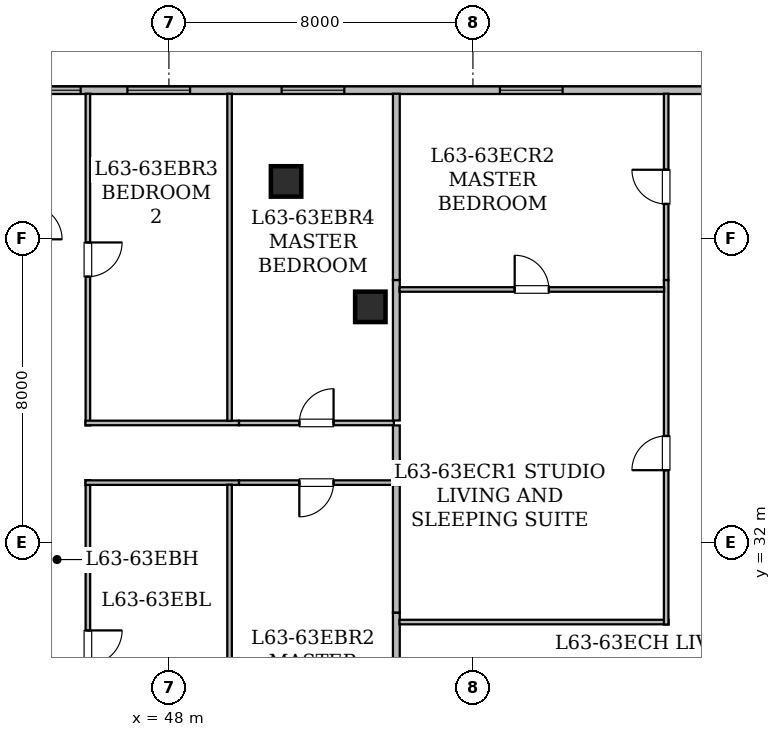
"""IFC4 building model, lengths in metres.
Left out: names, types, materials, properties, quantities, classifications, styles, units other than length and angle.
Written with IfcOpenShell. Run it as: python <this file> out.ifc"""

import sys

from ifc_helpers import new_model, si_unit, direction, frame, frame_2d, origin, origin_2d, place, context, subcontext, project, spatial, rectangle, hollow_rectangle, extrude, element, fill, save


model = new_model("IFC4")
c1 = context("Model", 3, precision=1e-05, world=origin(), true_north=direction((0.0, 1.0)))
c2 = subcontext(c1, "Body", "Model", "MODEL_VIEW")
j1 = project(units=[si_unit("LENGTHUNIT", "METRE"), si_unit("PLANEANGLEUNIT", "RADIAN")], contexts=[c1])
p1 = place(None, origin())
s1 = spatial("IfcSite", under=j1, at=p1, CompositionType="ELEMENT")
p2 = place(p1, origin())
s2 = spatial("IfcBuilding", under=s1, at=p2, CompositionType="ELEMENT")
p3 = place(p2, frame((0.0, 0.0, 246.4)))
s3 = spatial("IfcBuildingStorey", under=s2, at=p3, CompositionType="ELEMENT", Elevation=246.4)
for number, where, z_axis, x_axis in (
    (1, (51.083, 41.5, 0.0), (0.0, 0.0, 1.0), (1.0, 0.0, 0.0)),
    (2, (53.3, 38.2, 0.0), (0.0, 0.0, 1.0), (1.0, 0.0, 0.0)),
):
    element("IfcColumn", number, at=place(p3, frame(where, z_axis=z_axis, x_axis=x_axis)), inside=s3, PredefinedType="COLUMN", context=c2, shape_type="SweptSolid", body=[
        extrude(hollow_rectangle(XDim=0.8, YDim=0.8, WallThickness=0.04, at=origin_2d()), origin(), (0.0, 0.0, 1.0), 3.65),
    ])
p4 = place(p3, frame((24.302, 43.9, 0.0), z_axis=(0.0, 0.0, 1.0), x_axis=(1.0, 0.0, 0.0)))
e3 = element("IfcWall", 3, at=p4, inside=s3, PredefinedType="STANDARD", context=c2, shape_type="SweptSolid", body=[
    extrude(rectangle(XDim=41.457, YDim=0.2, at=frame_2d((20.729, 0.0))), origin(), (0.0, 0.0, 1.0), 3.43),
])
p5 = place(p4, frame((4.673, 0.0, 0.85)))
e4 = element("IfcOpeningElement", 4, at=p5, cuts=e3, PredefinedType="OPENING", context=c2, shape_type="SweptSolid", body=[
    extrude(rectangle(XDim=1.65, YDim=1.55, at=frame_2d((0.825, 0.775))), frame((0.0, 0.11, 0.0), z_axis=(0.0, -1.0, 0.0), x_axis=(1.0, 0.0, 0.0)), (0.0, 0.0, 1.0), 0.22),
])
p6 = place(p4, frame((12.063, 0.0, 0.85)))
e5 = element("IfcOpeningElement", 5, at=p6, cuts=e3, PredefinedType="OPENING", context=c2, shape_type="SweptSolid", body=[
    extrude(rectangle(XDim=1.65, YDim=1.55, at=frame_2d((0.825, 0.775))), frame((0.0, 0.11, 0.0), z_axis=(0.0, -1.0, 0.0), x_axis=(1.0, 0.0, 0.0)), (0.0, 0.0, 1.0), 0.22),
])
p7 = place(p4, frame((14.905, 0.0, 0.85)))
e6 = element("IfcOpeningElement", 6, at=p7, cuts=e3, PredefinedType="OPENING", context=c2, shape_type="SweptSolid", body=[
    extrude(rectangle(XDim=1.65, YDim=1.55, at=frame_2d((0.825, 0.775))), frame((0.0, 0.11, 0.0), z_axis=(0.0, -1.0, 0.0), x_axis=(1.0, 0.0, 0.0)), (0.0, 0.0, 1.0), 0.22),
])
p8 = place(p4, frame((17.825, 0.0, 0.85)))
e7 = element("IfcOpeningElement", 7, at=p8, cuts=e3, PredefinedType="OPENING", context=c2, shape_type="SweptSolid", body=[
    extrude(rectangle(XDim=1.65, YDim=1.55, at=frame_2d((0.825, 0.775))), frame((0.0, 0.11, 0.0), z_axis=(0.0, -1.0, 0.0), x_axis=(1.0, 0.0, 0.0)), (0.0, 0.0, 1.0), 0.22),
])
p9 = place(p4, frame((20.176, 0.0, 0.8)))
e8 = element("IfcOpeningElement", 8, at=p9, cuts=e3, PredefinedType="OPENING", context=c2, shape_type="SweptSolid", body=[
    extrude(rectangle(XDim=1.2, YDim=1.5, at=frame_2d((0.6, 0.75))), frame((0.0, 0.11, 0.0), z_axis=(0.0, -1.0, 0.0), x_axis=(1.0, 0.0, 0.0)), (0.0, 0.0, 1.0), 0.22),
])
p10 = place(p4, frame((22.605, 0.0, 0.85)))
e9 = element("IfcOpeningElement", 9, at=p10, cuts=e3, PredefinedType="OPENING", context=c2, shape_type="SweptSolid", body=[
    extrude(rectangle(XDim=1.65, YDim=1.55, at=frame_2d((0.825, 0.775))), frame((0.0, 0.11, 0.0), z_axis=(0.0, -1.0, 0.0), x_axis=(1.0, 0.0, 0.0)), (0.0, 0.0, 1.0), 0.22),
])
p11 = place(p4, frame((26.664, 0.0, 0.85)))
e10 = element("IfcOpeningElement", 10, at=p11, cuts=e3, PredefinedType="OPENING", context=c2, shape_type="SweptSolid", body=[
    extrude(rectangle(XDim=1.65, YDim=1.55, at=frame_2d((0.825, 0.775))), frame((0.0, 0.11, 0.0), z_axis=(0.0, -1.0, 0.0), x_axis=(1.0, 0.0, 0.0)), (0.0, 0.0, 1.0), 0.22),
])
p12 = place(p4, frame((32.408, 0.0, 0.85)))
e11 = element("IfcOpeningElement", 11, at=p12, cuts=e3, PredefinedType="OPENING", context=c2, shape_type="SweptSolid", body=[
    extrude(rectangle(XDim=1.65, YDim=1.55, at=frame_2d((0.825, 0.775))), frame((0.0, 0.11, 0.0), z_axis=(0.0, -1.0, 0.0), x_axis=(1.0, 0.0, 0.0)), (0.0, 0.0, 1.0), 0.22),
])
p13 = place(p4, frame((38.688, 0.0, 0.85)))
e12 = element("IfcOpeningElement", 12, at=p13, cuts=e3, PredefinedType="OPENING", context=c2, shape_type="SweptSolid", body=[
    extrude(rectangle(XDim=1.65, YDim=1.55, at=frame_2d((0.825, 0.775))), frame((0.0, 0.11, 0.0), z_axis=(0.0, -1.0, 0.0), x_axis=(1.0, 0.0, 0.0)), (0.0, 0.0, 1.0), 0.22),
])
p14 = place(p3, frame((45.868, 33.64, 0.0), z_axis=(0.0, 0.0, 1.0), x_axis=(0.0, -1.0, 0.0)))
e13 = element("IfcWall", 13, at=p14, inside=s3, PredefinedType="PARTITIONING", context=c2, shape_type="SweptSolid", body=[
    extrude(rectangle(XDim=8.808, YDim=0.12, at=frame_2d((4.404, 0.0))), origin(), (0.0, 0.0, 1.0), 2.957),
])
p15 = place(p14, frame((3.954, 0.0, 0.0)))
e14 = element("IfcOpeningElement", 14, at=p15, cuts=e13, PredefinedType="OPENING", context=c2, shape_type="SweptSolid", body=[
    extrude(rectangle(XDim=0.9, YDim=2.1, at=frame_2d((0.45, 1.05))), frame((0.0, 0.07, 0.0), z_axis=(0.0, -1.0, 0.0), x_axis=(1.0, 0.0, 0.0)), (0.0, 0.0, 1.0), 0.14),
])
p16 = place(p3, frame((49.845, 33.575, 0.0), z_axis=(0.0, 0.0, 1.0), x_axis=(-1.0, 0.0, 0.0)))
e15 = element("IfcWall", 15, at=p16, inside=s3, PredefinedType="PARTITIONING", context=c2, shape_type="SweptSolid", body=[
    extrude(rectangle(XDim=4.042, YDim=0.12, at=frame_2d((2.021, 0.0))), origin(), (0.0, 0.0, 1.0), 2.957),
])
p17 = place(p3, frame((53.92, 33.575, 0.0), z_axis=(0.0, 0.0, 1.0), x_axis=(-1.0, 0.0, 0.0)))
e16 = element("IfcWall", 16, at=p17, inside=s3, PredefinedType="PARTITIONING", context=c2, shape_type="SweptSolid", body=[
    extrude(rectangle(XDim=4.075, YDim=0.12, at=frame_2d((2.038, 0.0))), origin(), (0.0, 0.0, 1.0), 2.725),
])
p18 = place(p17, frame((1.588, 0.0, 0.0)))
e17 = element("IfcOpeningElement", 17, at=p18, cuts=e16, PredefinedType="OPENING", context=c2, shape_type="SweptSolid", body=[
    extrude(rectangle(XDim=0.9, YDim=2.1, at=frame_2d((0.45, 1.05))), frame((0.0, 0.07, 0.0), z_axis=(0.0, -1.0, 0.0), x_axis=(1.0, 0.0, 0.0)), (0.0, 0.0, 1.0), 0.14),
])
p19 = place(p3, frame((45.868, 43.808, 0.0), z_axis=(0.0, 0.0, 1.0), x_axis=(0.0, -1.0, 0.0)))
e18 = element("IfcWall", 18, at=p19, inside=s3, PredefinedType="PARTITIONING", context=c2, shape_type="SweptSolid", body=[
    extrude(rectangle(XDim=8.728, YDim=0.12, at=frame_2d((4.364, 0.0))), origin(), (0.0, 0.0, 1.0), 2.725),
])
p20 = place(p19, frame((3.914, 0.0, 0.0)))
e19 = element("IfcOpeningElement", 19, at=p20, cuts=e18, PredefinedType="OPENING", context=c2, shape_type="SweptSolid", body=[
    extrude(rectangle(XDim=0.9, YDim=2.1, at=frame_2d((0.45, 1.05))), frame((0.0, 0.07, 0.0), z_axis=(0.0, -1.0, 0.0), x_axis=(1.0, 0.0, 0.0)), (0.0, 0.0, 1.0), 0.14),
])
p21 = place(p3, frame((45.803, 35.145, 0.0), z_axis=(0.0, 0.0, 1.0), x_axis=(1.0, 0.0, 0.0)))
e20 = element("IfcWall", 20, at=p21, inside=s3, PredefinedType="PARTITIONING", context=c2, shape_type="SweptSolid", body=[
    extrude(rectangle(XDim=4.042, YDim=0.12, at=frame_2d((2.021, 0.0))), origin(), (0.0, 0.0, 1.0), 3.43),
])
p22 = place(p3, frame((49.845, 35.145, 0.0), z_axis=(0.0, 0.0, 1.0), x_axis=(1.0, 0.0, 0.0)))
e21 = element("IfcWall", 21, at=p22, inside=s3, PredefinedType="PARTITIONING", context=c2, shape_type="SweptSolid", body=[
    extrude(rectangle(XDim=4.075, YDim=0.12, at=frame_2d((2.038, 0.0))), origin(), (0.0, 0.0, 1.0), 2.725),
])
p23 = place(p22, frame((1.588, 0.0, 0.0)))
e22 = element("IfcOpeningElement", 22, at=p23, cuts=e21, PredefinedType="OPENING", context=c2, shape_type="SweptSolid", body=[
    extrude(rectangle(XDim=0.9, YDim=2.1, at=frame_2d((0.45, 1.05))), frame((0.0, 0.07, 0.0), z_axis=(0.0, -1.0, 0.0), x_axis=(1.0, 0.0, 0.0)), (0.0, 0.0, 1.0), 0.14),
])
p24 = place(p3, frame((53.985, 35.08, 0.0), z_axis=(0.0, 0.0, 1.0), x_axis=(0.0, -1.0, 0.0)))
e23 = element("IfcWall", 23, at=p24, inside=s3, PredefinedType="STANDARD", context=c2, shape_type="SweptSolid", body=[
    extrude(rectangle(XDim=1.44, YDim=0.18, at=frame_2d((0.72, 0.0))), origin(), (0.0, 0.0, 1.0), 2.687),
])
p25 = place(p3, frame((49.596, 33.521, 0.0), z_axis=(0.0, 0.0, 1.0), x_axis=(0.0, -1.0, 0.0)))
e24 = element("IfcWall", 24, at=p25, inside=s3, PredefinedType="PARTITIONING", context=c2, shape_type="SweptSolid", body=[
    extrude(rectangle(XDim=8.689, YDim=0.12, at=frame_2d((4.344, 0.0))), origin(), (0.0, 0.0, 1.0), 2.957),
])
p26 = place(p3, frame((53.985, 30.155, 0.0), z_axis=(0.0, 0.0, 1.0), x_axis=(0.0, -1.0, 0.0)))
e25 = element("IfcWall", 25, at=p26, inside=s3, PredefinedType="STANDARD", context=c2, shape_type="SweptSolid", body=[
    extrude(rectangle(XDim=2.078, YDim=0.18, at=frame_2d((1.039, 0.0))), origin(), (0.0, 0.0, 1.0), 3.43),
])
p27 = place(p3, frame((53.985, 33.51, 0.0), z_axis=(0.0, 0.0, 1.0), x_axis=(0.0, -1.0, 0.0)))
e26 = element("IfcWall", 26, at=p27, inside=s3, PredefinedType="STANDARD", context=c2, shape_type="SweptSolid", body=[
    extrude(rectangle(XDim=3.355, YDim=0.18, at=frame_2d((1.677, 0.0))), origin(), (0.0, 0.0, 1.0), 2.687),
])
p28 = place(p3, frame((49.596, 43.808, 0.0), z_axis=(0.0, 0.0, 1.0), x_axis=(0.0, -1.0, 0.0)))
e27 = element("IfcWall", 27, at=p28, inside=s3, PredefinedType="PARTITIONING", context=c2, shape_type="SweptSolid", body=[
    extrude(rectangle(XDim=8.609, YDim=0.12, at=frame_2d((4.305, 0.0))), origin(), (0.0, 0.0, 1.0), 2.725),
])
p29 = place(p3, frame((53.985, 38.906, 0.0), z_axis=(0.0, 0.0, 1.0), x_axis=(0.0, -1.0, 0.0)))
e28 = element("IfcWall", 28, at=p29, inside=s3, PredefinedType="STANDARD", context=c2, shape_type="SweptSolid", body=[
    extrude(rectangle(XDim=3.696, YDim=0.18, at=frame_2d((1.848, 0.0))), origin(), (0.0, 0.0, 1.0), 2.725),
])
p30 = place(p3, frame((53.985, 43.808, 0.0), z_axis=(0.0, 0.0, 1.0), x_axis=(0.0, -1.0, 0.0)))
e29 = element("IfcWall", 29, at=p30, inside=s3, PredefinedType="STANDARD", context=c2, shape_type="SweptSolid", body=[
    extrude(rectangle(XDim=4.902, YDim=0.18, at=frame_2d((2.451, 0.0))), origin(), (0.0, 0.0, 1.0), 2.887),
])
p31 = place(p3, frame((54.067, 29.906, 0.0), z_axis=(0.0, 0.0, 1.0), x_axis=(1.0, 0.0, 0.0)))
e30 = element("IfcWall", 30, at=p31, inside=s3, PredefinedType="PARTITIONING", context=c2, shape_type="SweptSolid", body=[
    extrude(rectangle(XDim=7.083, YDim=0.12, at=frame_2d((3.542, 0.0))), origin(), (0.0, 0.0, 1.0), 3.43),
])
p32 = place(p3, frame((61.085, 29.841, 0.0), z_axis=(0.0, 0.0, 1.0), x_axis=(0.0, 1.0, 0.0)))
e31 = element("IfcWall", 31, at=p32, inside=s3, PredefinedType="PARTITIONING", context=c2, shape_type="SweptSolid", body=[
    extrude(rectangle(XDim=9.065, YDim=0.12, at=frame_2d((4.532, 0.0))), origin(), (0.0, 0.0, 1.0), 2.687),
])
p33 = place(p32, frame((4.061, 0.0, 0.0)))
e32 = element("IfcOpeningElement", 32, at=p33, cuts=e31, PredefinedType="OPENING", context=c2, shape_type="SweptSolid", body=[
    extrude(rectangle(XDim=0.9, YDim=2.1, at=frame_2d((0.45, 1.05))), frame((0.0, 0.07, 0.0), z_axis=(0.0, -1.0, 0.0), x_axis=(1.0, 0.0, 0.0)), (0.0, 0.0, 1.0), 0.14),
])
p34 = place(p3, frame((61.085, 38.906, 0.0), z_axis=(0.0, 0.0, 1.0), x_axis=(0.0, 1.0, 0.0)))
e33 = element("IfcWall", 33, at=p34, inside=s3, PredefinedType="PARTITIONING", context=c2, shape_type="SweptSolid", body=[
    extrude(rectangle(XDim=4.902, YDim=0.12, at=frame_2d((2.451, 0.0))), origin(), (0.0, 0.0, 1.0), 2.725),
])
p35 = place(p34, frame((2.001, 0.0, 0.0)))
e34 = element("IfcOpeningElement", 34, at=p35, cuts=e33, PredefinedType="OPENING", context=c2, shape_type="SweptSolid", body=[
    extrude(rectangle(XDim=0.9, YDim=2.1, at=frame_2d((0.45, 1.05))), frame((0.0, 0.07, 0.0), z_axis=(0.0, -1.0, 0.0), x_axis=(1.0, 0.0, 0.0)), (0.0, 0.0, 1.0), 0.14),
])
p36 = place(p3, frame((54.067, 38.657, 0.0), z_axis=(0.0, 0.0, 1.0), x_axis=(1.0, 0.0, 0.0)))
e35 = element("IfcWall", 35, at=p36, inside=s3, PredefinedType="PARTITIONING", context=c2, shape_type="SweptSolid", body=[
    extrude(rectangle(XDim=6.964, YDim=0.12, at=frame_2d((3.482, 0.0))), origin(), (0.0, 0.0, 1.0), 2.725),
])
p37 = place(p36, frame((3.032, 0.0, 0.0)))
e36 = element("IfcOpeningElement", 36, at=p37, cuts=e35, PredefinedType="OPENING", context=c2, shape_type="SweptSolid", body=[
    extrude(rectangle(XDim=0.9, YDim=2.1, at=frame_2d((0.45, 1.05))), frame((0.0, 0.07, 0.0), z_axis=(0.0, -1.0, 0.0), x_axis=(1.0, 0.0, 0.0)), (0.0, 0.0, 1.0), 0.14),
])
p38 = place(p9, origin())
e37 = element("IfcWindow", 37, at=p38, inside=s3, PartitioningType="SINGLE_PANEL", PredefinedType="WINDOW", context=c2, shape_type="SweptSolid", body=[
    extrude(rectangle(XDim=1.2, YDim=1.5, at=frame_2d((0.6, 0.75))), frame((0.0, 0.03, 0.0), z_axis=(0.0, -1.0, 0.0), x_axis=(1.0, 0.0, 0.0)), (0.0, 0.0, 1.0), 0.06),
])
fill(e8, e37)
p39 = place(p10, origin())
e38 = element("IfcWindow", 38, at=p39, inside=s3, PartitioningType="SINGLE_PANEL", PredefinedType="WINDOW", context=c2, shape_type="SweptSolid", body=[
    extrude(rectangle(XDim=1.65, YDim=1.55, at=frame_2d((0.825, 0.775))), frame((0.0, 0.03, 0.0), z_axis=(0.0, -1.0, 0.0), x_axis=(1.0, 0.0, 0.0)), (0.0, 0.0, 1.0), 0.06),
])
fill(e9, e38)
p40 = place(p11, origin())
e39 = element("IfcWindow", 39, at=p40, inside=s3, PartitioningType="SINGLE_PANEL", PredefinedType="WINDOW", context=c2, shape_type="SweptSolid", body=[
    extrude(rectangle(XDim=1.65, YDim=1.55, at=frame_2d((0.825, 0.775))), frame((0.0, 0.03, 0.0), z_axis=(0.0, -1.0, 0.0), x_axis=(1.0, 0.0, 0.0)), (0.0, 0.0, 1.0), 0.06),
])
fill(e10, e39)
p41 = place(p12, origin())
e40 = element("IfcWindow", 40, at=p41, inside=s3, PartitioningType="SINGLE_PANEL", PredefinedType="WINDOW", context=c2, shape_type="SweptSolid", body=[
    extrude(rectangle(XDim=1.65, YDim=1.55, at=frame_2d((0.825, 0.775))), frame((0.0, 0.03, 0.0), z_axis=(0.0, -1.0, 0.0), x_axis=(1.0, 0.0, 0.0)), (0.0, 0.0, 1.0), 0.06),
])
fill(e11, e40)
p42 = place(p15, origin())
e41 = element("IfcDoor", 41, at=p42, inside=s3, OperationType="SINGLE_SWING_LEFT", PredefinedType="DOOR", context=c2, shape_type="SweptSolid", body=[
    extrude(rectangle(XDim=0.9, YDim=2.1, at=frame_2d((0.45, 1.05))), frame((0.0, 0.025, 0.0), z_axis=(0.0, -1.0, 0.0), x_axis=(1.0, 0.0, 0.0)), (0.0, 0.0, 1.0), 0.05),
])
fill(e14, e41)
p43 = place(p18, origin())
e42 = element("IfcDoor", 42, at=p43, inside=s3, OperationType="SINGLE_SWING_RIGHT", PredefinedType="DOOR", context=c2, shape_type="SweptSolid", body=[
    extrude(rectangle(XDim=0.9, YDim=2.1, at=frame_2d((0.45, 1.05))), frame((0.0, 0.025, 0.0), z_axis=(0.0, -1.0, 0.0), x_axis=(1.0, 0.0, 0.0)), (0.0, 0.0, 1.0), 0.05),
])
fill(e17, e42)
p44 = place(p20, origin())
e43 = element("IfcDoor", 43, at=p44, inside=s3, OperationType="SINGLE_SWING_LEFT", PredefinedType="DOOR", context=c2, shape_type="SweptSolid", body=[
    extrude(rectangle(XDim=0.9, YDim=2.1, at=frame_2d((0.45, 1.05))), frame((0.0, 0.025, 0.0), z_axis=(0.0, -1.0, 0.0), x_axis=(1.0, 0.0, 0.0)), (0.0, 0.0, 1.0), 0.05),
])
fill(e19, e43)
p45 = place(p23, origin())
e44 = element("IfcDoor", 44, at=p45, inside=s3, OperationType="SINGLE_SWING_RIGHT", PredefinedType="DOOR", context=c2, shape_type="SweptSolid", body=[
    extrude(rectangle(XDim=0.9, YDim=2.1, at=frame_2d((0.45, 1.05))), frame((0.0, 0.025, 0.0), z_axis=(0.0, -1.0, 0.0), x_axis=(1.0, 0.0, 0.0)), (0.0, 0.0, 1.0), 0.05),
])
fill(e22, e44)
p46 = place(p33, origin())
e45 = element("IfcDoor", 45, at=p46, inside=s3, OperationType="SINGLE_SWING_LEFT", PredefinedType="DOOR", context=c2, shape_type="SweptSolid", body=[
    extrude(rectangle(XDim=0.9, YDim=2.1, at=frame_2d((0.45, 1.05))), frame((0.0, 0.025, 0.0), z_axis=(0.0, -1.0, 0.0), x_axis=(1.0, 0.0, 0.0)), (0.0, 0.0, 1.0), 0.05),
])
fill(e32, e45)
p47 = place(p35, origin())
e46 = element("IfcDoor", 46, at=p47, inside=s3, OperationType="SINGLE_SWING_RIGHT", PredefinedType="DOOR", context=c2, shape_type="SweptSolid", body=[
    extrude(rectangle(XDim=0.9, YDim=2.1, at=frame_2d((0.45, 1.05))), frame((0.0, 0.025, 0.0), z_axis=(0.0, -1.0, 0.0), x_axis=(1.0, 0.0, 0.0)), (0.0, 0.0, 1.0), 0.05),
])
fill(e34, e46)
p48 = place(p37, origin())
e47 = element("IfcDoor", 47, at=p48, inside=s3, OperationType="SINGLE_SWING_LEFT", PredefinedType="DOOR", context=c2, shape_type="SweptSolid", body=[
    extrude(rectangle(XDim=0.9, YDim=2.1, at=frame_2d((0.45, 1.05))), frame((0.0, 0.025, 0.0), z_axis=(0.0, -1.0, 0.0), x_axis=(1.0, 0.0, 0.0)), (0.0, 0.0, 1.0), 0.05),
])
fill(e36, e47)
save(model, sys.argv[1])
